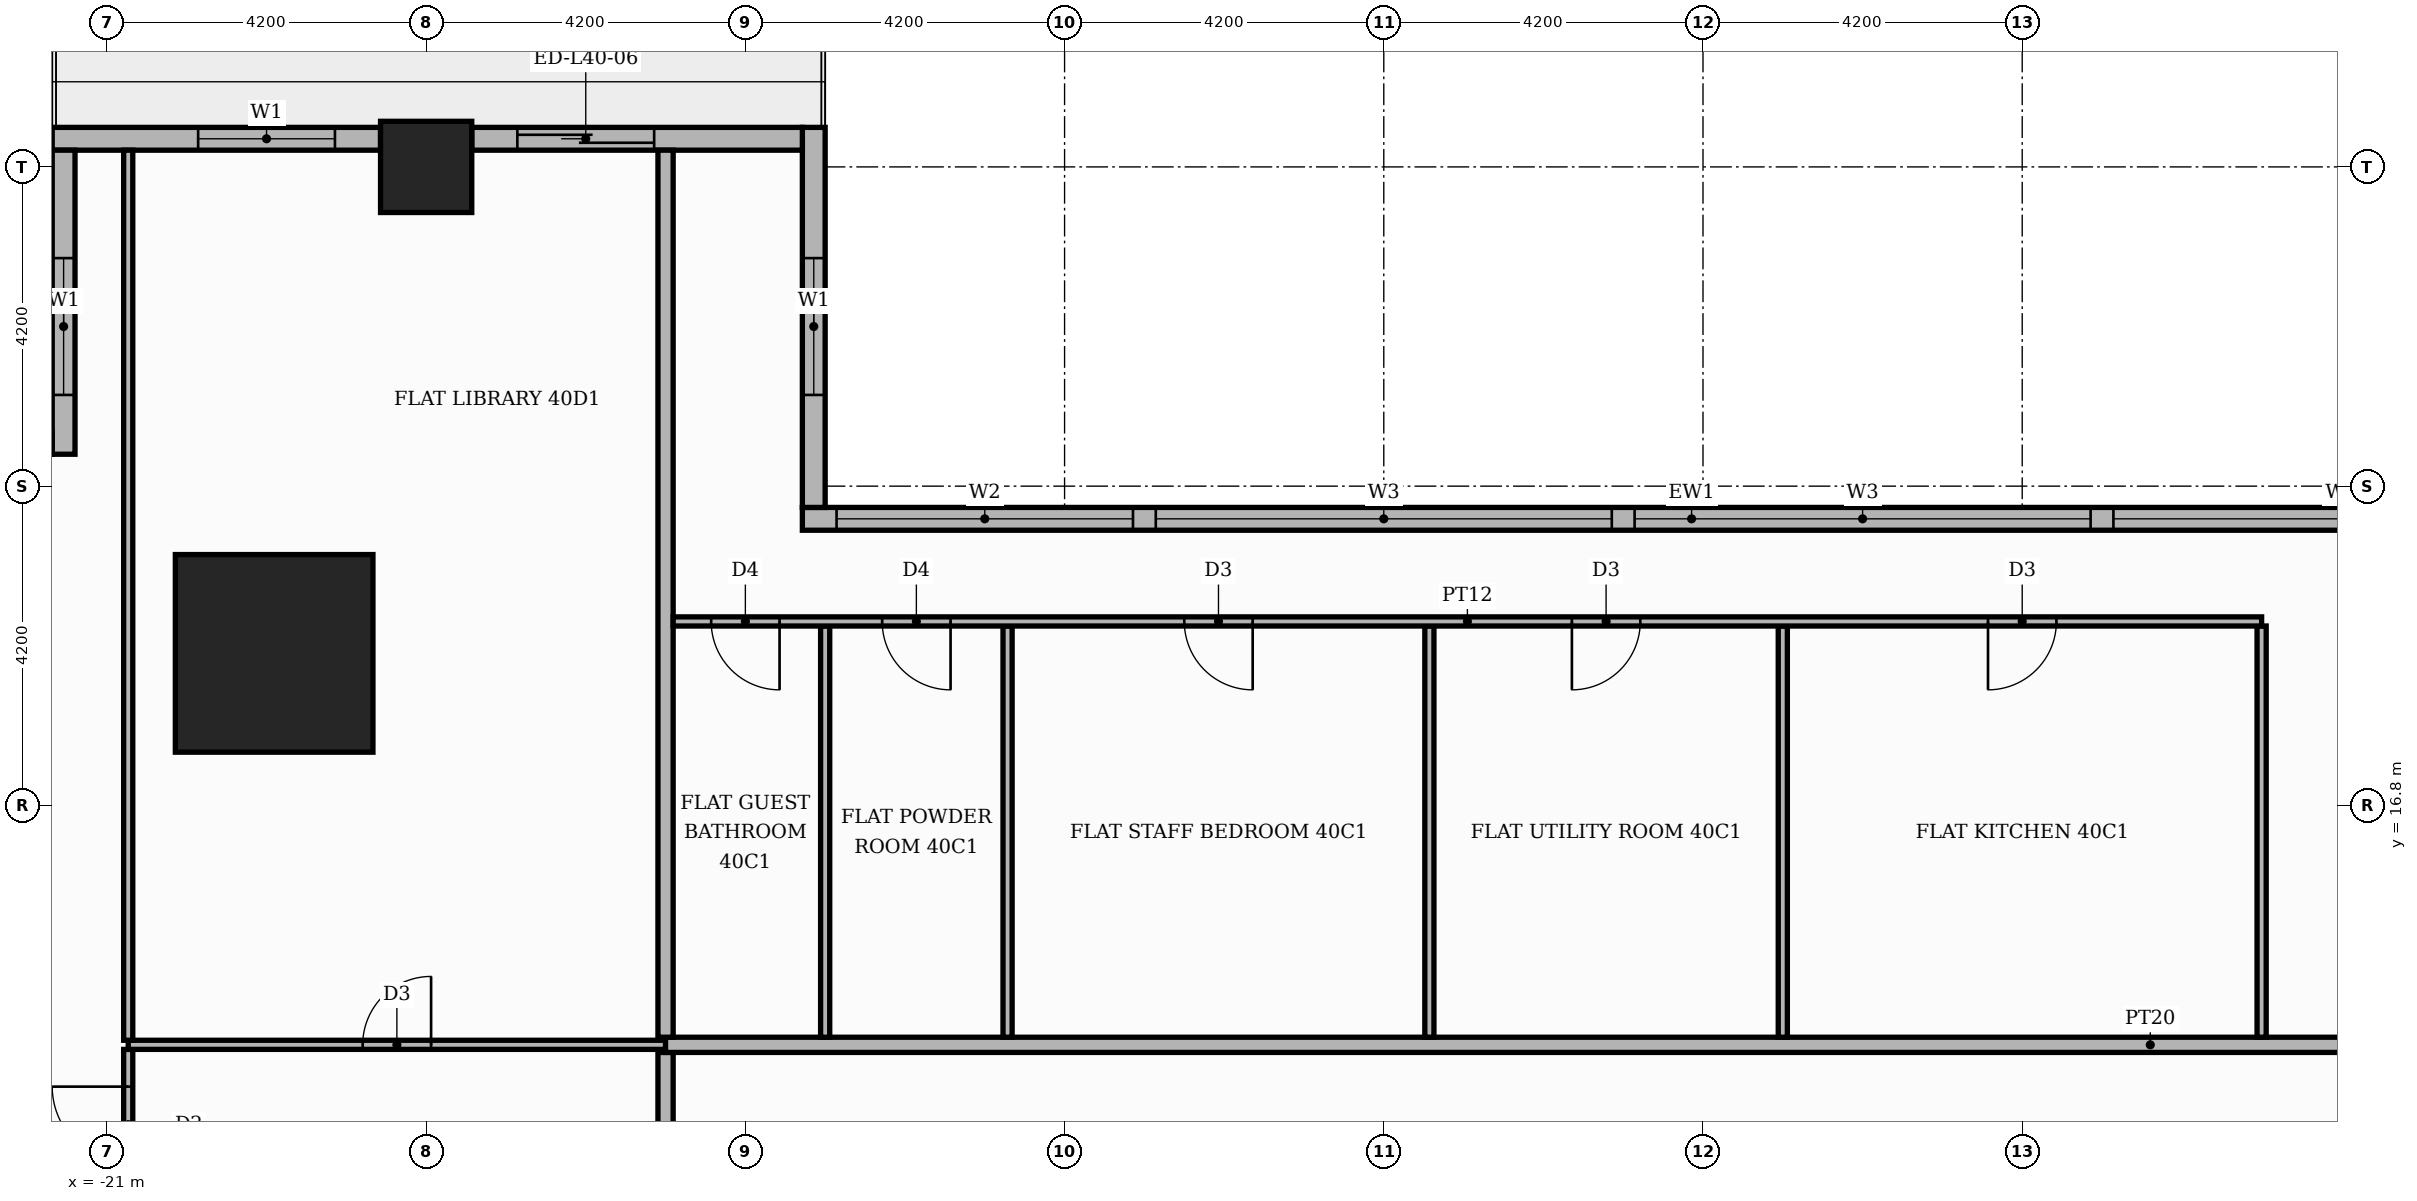
"""IFC4 building model, lengths in metres.
Left out: names, types, materials, properties, quantities, classifications, styles, units other than length and angle.
Written with IfcOpenShell. Run it as: python <this file> out.ifc"""

import sys

from ifc_helpers import new_model, si_unit, direction, frame, frame_2d, origin, origin_2d, place, context, subcontext, project, spatial, rectangle, extrude, element, fill, save


model = new_model("IFC4")
c1 = context("Model", 3, precision=1e-05, world=origin(), true_north=direction((0.0, 1.0)))
c2 = subcontext(c1, "Body", "Model", "MODEL_VIEW")
j1 = project(units=[si_unit("LENGTHUNIT", "METRE"), si_unit("PLANEANGLEUNIT", "RADIAN")], contexts=[c1])
p1 = place(None, origin())
s1 = spatial("IfcSite", under=j1, at=p1, CompositionType="ELEMENT")
p2 = place(p1, origin())
s2 = spatial("IfcBuilding", under=s1, at=p2, CompositionType="ELEMENT")
p3 = place(p2, frame((0.0, 0.0, 168.9)))
s3 = spatial("IfcBuildingStorey", under=s2, at=p3, CompositionType="ELEMENT", Elevation=168.9)
p4 = place(p3, frame((-18.8, 18.8, 0.0), z_axis=(0.0, 0.0, 1.0), x_axis=(1.0, 0.0, 0.0)))
e1 = element("IfcColumn", 1, at=p4, inside=s3, PredefinedType="COLUMN", context=c2, shape_type="SweptSolid", body=[
    extrude(rectangle(XDim=2.6, YDim=2.6, at=origin_2d()), origin(), (0.0, 0.0, 1.0), 3.9),
])
p5 = place(p3, frame((-16.8, 25.2, 0.0), z_axis=(0.0, 0.0, 1.0), x_axis=(1.0, 0.0, 0.0)))
e2 = element("IfcColumn", 2, at=p5, inside=s3, PredefinedType="COLUMN", context=c2, shape_type="SweptSolid", body=[
    extrude(rectangle(XDim=1.2, YDim=1.2, at=origin_2d()), origin(), (0.0, 0.0, 1.0), 3.9),
])
p6 = place(p3, frame((11.55, 20.57, 0.0), z_axis=(0.0, 0.0, 1.0), x_axis=(-1.0, 0.0, 0.0)))
e3 = element("IfcWall", 3, at=p6, inside=s3, PredefinedType="STANDARD", context=c2, shape_type="SweptSolid", body=[
    extrude(rectangle(XDim=23.4, YDim=0.3, at=frame_2d((11.7, 0.0))), origin(), (0.0, 0.0, 1.0), 3.48),
])
p7 = place(p6, frame((0.15, 0.0, 0.9)))
e4 = element("IfcOpeningElement", 4, at=p7, cuts=e3, PredefinedType="OPENING", context=c2, shape_type="SweptSolid", body=[
    extrude(rectangle(XDim=6.0, YDim=2.1, at=frame_2d((3.0, 1.05))), frame((0.0, 0.16, 0.0), z_axis=(0.0, -1.0, 0.0), x_axis=(1.0, 0.0, 0.0)), (0.0, 0.0, 1.0), 0.32),
])
p8 = place(p6, frame((6.45, 0.0, 0.9)))
e5 = element("IfcOpeningElement", 5, at=p8, cuts=e3, PredefinedType="OPENING", context=c2, shape_type="SweptSolid", body=[
    extrude(rectangle(XDim=6.0, YDim=2.1, at=frame_2d((3.0, 1.05))), frame((0.0, 0.16, 0.0), z_axis=(0.0, -1.0, 0.0), x_axis=(1.0, 0.0, 0.0)), (0.0, 0.0, 1.0), 0.32),
])
p9 = place(p6, frame((12.75, 0.0, 0.9)))
e6 = element("IfcOpeningElement", 6, at=p9, cuts=e3, PredefinedType="OPENING", context=c2, shape_type="SweptSolid", body=[
    extrude(rectangle(XDim=6.0, YDim=2.1, at=frame_2d((3.0, 1.05))), frame((0.0, 0.16, 0.0), z_axis=(0.0, -1.0, 0.0), x_axis=(1.0, 0.0, 0.0)), (0.0, 0.0, 1.0), 0.32),
])
p10 = place(p6, frame((19.05, 0.0, 0.9)))
e7 = element("IfcOpeningElement", 7, at=p10, cuts=e3, PredefinedType="OPENING", context=c2, shape_type="SweptSolid", body=[
    extrude(rectangle(XDim=3.9, YDim=2.1, at=frame_2d((1.95, 1.05))), frame((0.0, 0.16, 0.0), z_axis=(0.0, -1.0, 0.0), x_axis=(1.0, 0.0, 0.0)), (0.0, 0.0, 1.0), 0.32),
])
p11 = place(p3, frame((-11.7, 20.72, 0.0), z_axis=(0.0, 0.0, 1.0), x_axis=(0.0, 1.0, 0.0)))
e8 = element("IfcWall", 8, at=p11, inside=s3, PredefinedType="STANDARD", context=c2, shape_type="SweptSolid", body=[
    extrude(rectangle(XDim=5.0, YDim=0.3, at=frame_2d((2.5, 0.0))), origin(), (0.0, 0.0, 1.0), 3.48),
])
p12 = place(p11, frame((1.48, 0.0, 0.9)))
e9 = element("IfcOpeningElement", 9, at=p12, cuts=e8, PredefinedType="OPENING", context=c2, shape_type="SweptSolid", body=[
    extrude(rectangle(XDim=1.8, YDim=2.1, at=frame_2d((0.9, 1.05))), frame((0.0, 0.16, 0.0), z_axis=(0.0, -1.0, 0.0), x_axis=(1.0, 0.0, 0.0)), (0.0, 0.0, 1.0), 0.32),
])
p13 = place(p3, frame((-11.85, 25.57, 0.0), z_axis=(0.0, 0.0, 1.0), x_axis=(-1.0, 0.0, 0.0)))
e10 = element("IfcWall", 10, at=p13, inside=s3, PredefinedType="STANDARD", context=c2, shape_type="SweptSolid", body=[
    extrude(rectangle(XDim=4.35, YDim=0.3, at=frame_2d((2.175, 0.0))), origin(), (0.0, 0.0, 1.0), 3.48),
])
p14 = place(p13, frame((1.95, 0.0, 0.0)))
e11 = element("IfcOpeningElement", 11, at=p14, cuts=e10, PredefinedType="OPENING", context=c2, shape_type="SweptSolid", body=[
    extrude(rectangle(XDim=1.8, YDim=2.4, at=frame_2d((0.9, 1.2))), frame((0.0, 0.16, 0.0), z_axis=(0.0, -1.0, 0.0), x_axis=(1.0, 0.0, 0.0)), (0.0, 0.0, 1.0), 0.32),
])
p15 = place(p3, frame((-17.4, 25.57, 0.0), z_axis=(0.0, 0.0, 1.0), x_axis=(-1.0, 0.0, 0.0)))
e12 = element("IfcWall", 12, at=p15, inside=s3, PredefinedType="STANDARD", context=c2, shape_type="SweptSolid", body=[
    extrude(rectangle(XDim=4.32, YDim=0.3, at=frame_2d((2.16, 0.0))), origin(), (0.0, 0.0, 1.0), 3.48),
])
p16 = place(p15, frame((0.6, 0.0, 0.9)))
e13 = element("IfcOpeningElement", 13, at=p16, cuts=e12, PredefinedType="OPENING", context=c2, shape_type="SweptSolid", body=[
    extrude(rectangle(XDim=1.8, YDim=2.1, at=frame_2d((0.9, 1.05))), frame((0.0, 0.16, 0.0), z_axis=(0.0, -1.0, 0.0), x_axis=(1.0, 0.0, 0.0)), (0.0, 0.0, 1.0), 0.32),
])
p17 = place(p3, frame((-21.57, 25.42, 0.0), z_axis=(0.0, 0.0, 1.0), x_axis=(0.0, -1.0, 0.0)))
e14 = element("IfcWall", 14, at=p17, inside=s3, PredefinedType="STANDARD", context=c2, shape_type="SweptSolid", body=[
    extrude(rectangle(XDim=4.0, YDim=0.3, at=frame_2d((2.0, 0.0))), origin(), (0.0, 0.0, 1.0), 3.48),
])
p18 = place(p17, frame((1.42, 0.0, 0.9)))
e15 = element("IfcOpeningElement", 15, at=p18, cuts=e14, PredefinedType="OPENING", context=c2, shape_type="SweptSolid", body=[
    extrude(rectangle(XDim=1.8, YDim=2.1, at=frame_2d((0.9, 1.05))), frame((0.0, 0.16, 0.0), z_axis=(0.0, -1.0, 0.0), x_axis=(1.0, 0.0, 0.0)), (0.0, 0.0, 1.0), 0.32),
])
p19 = place(p3, frame((-13.65, 11.1, 0.0), z_axis=(0.0, 0.0, 1.0), x_axis=(0.0, 1.0, 0.0)))
e16 = element("IfcWall", 16, at=p19, inside=s3, PredefinedType="PARTITIONING", context=c2, shape_type="SweptSolid", body=[
    extrude(rectangle(XDim=2.45, YDim=0.2, at=frame_2d((1.225, 0.0))), origin(), (0.0, 0.0, 1.0), 3.48),
])
p20 = place(p3, frame((-20.72, 11.61, 0.0), z_axis=(0.0, 0.0, 1.0), x_axis=(0.0, 1.0, 0.0)))
e17 = element("IfcWall", 17, at=p20, inside=s3, PredefinedType="PARTITIONING", context=c2, shape_type="SweptSolid", body=[
    extrude(rectangle(XDim=1.98, YDim=0.12, at=frame_2d((0.99, 0.0))), origin(), (0.0, 0.0, 1.0), 3.48),
])
p21 = place(p20, frame((0.49, 0.0, 0.0)))
e18 = element("IfcOpeningElement", 18, at=p21, cuts=e17, PredefinedType="OPENING", context=c2, shape_type="SweptSolid", body=[
    extrude(rectangle(XDim=1.0, YDim=2.1, at=frame_2d((0.5, 1.05))), frame((0.0, 0.07, 0.0), z_axis=(0.0, -1.0, 0.0), x_axis=(1.0, 0.0, 0.0)), (0.0, 0.0, 1.0), 0.14),
])
p22 = place(p3, frame((-20.72, 13.65, 0.0), z_axis=(0.0, 0.0, 1.0), x_axis=(1.0, 0.0, 0.0)))
e19 = element("IfcWall", 19, at=p22, inside=s3, PredefinedType="PARTITIONING", context=c2, shape_type="SweptSolid", body=[
    extrude(rectangle(XDim=7.07, YDim=0.12, at=frame_2d((3.535, 0.0))), origin(), (0.0, 0.0, 1.0), 3.48),
])
p23 = place(p22, frame((3.085, 0.0, 0.0)))
e20 = element("IfcOpeningElement", 20, at=p23, cuts=e19, PredefinedType="OPENING", context=c2, shape_type="SweptSolid", body=[
    extrude(rectangle(XDim=0.9, YDim=2.1, at=frame_2d((0.45, 1.05))), frame((0.0, 0.07, 0.0), z_axis=(0.0, -1.0, 0.0), x_axis=(1.0, 0.0, 0.0)), (0.0, 0.0, 1.0), 0.14),
])
p24 = place(p3, frame((-13.65, 13.65, 0.0), z_axis=(0.0, 0.0, 1.0), x_axis=(1.0, 0.0, 0.0)))
e21 = element("IfcWall", 21, at=p24, inside=s3, PredefinedType="PARTITIONING", context=c2, shape_type="SweptSolid", body=[
    extrude(rectangle(XDim=39.07, YDim=0.2, at=frame_2d((19.535, 0.0))), origin(), (0.0, 0.0, 1.0), 3.48),
])
p25 = place(p24, frame((23.6, 0.0, 0.0)))
e22 = element("IfcOpeningElement", 22, at=p25, cuts=e21, PredefinedType="OPENING", context=c2, shape_type="SweptSolid", body=[
    extrude(rectangle(XDim=1.1, YDim=2.4, at=frame_2d((0.55, 1.2))), frame((0.0, 0.11, 0.0), z_axis=(0.0, -1.0, 0.0), x_axis=(1.0, 0.0, 0.0)), (0.0, 0.0, 1.0), 0.22),
])
p26 = place(p3, frame((-20.72, 13.71, 0.0), z_axis=(0.0, 0.0, 1.0), x_axis=(0.0, 1.0, 0.0)))
e23 = element("IfcWall", 23, at=p26, inside=s3, PredefinedType="PARTITIONING", context=c2, shape_type="SweptSolid", body=[
    extrude(rectangle(XDim=11.71, YDim=0.12, at=frame_2d((5.855, 0.0))), origin(), (0.0, 0.0, 1.0), 3.48),
])
p27 = place(p3, frame((-13.65, 13.75, 0.0), z_axis=(0.0, 0.0, 1.0), x_axis=(0.0, 1.0, 0.0)))
e24 = element("IfcWall", 24, at=p27, inside=s3, PredefinedType="PARTITIONING", context=c2, shape_type="SweptSolid", body=[
    extrude(rectangle(XDim=11.67, YDim=0.2, at=frame_2d((5.835, 0.0))), origin(), (0.0, 0.0, 1.0), 3.48),
])
for number, where, z_axis, x_axis in (
    (25, (-11.55, 13.75, 0.0), (0.0, 0.0, 1.0), (0.0, 1.0, 0.0)),
    (26, (-9.15, 13.75, 0.0), (0.0, 0.0, 1.0), (0.0, 1.0, 0.0)),
    (27, (-3.6, 13.75, 0.0), (0.0, 0.0, 1.0), (0.0, 1.0, 0.0)),
    (28, (1.05, 13.75, 0.0), (0.0, 0.0, 1.0), (0.0, 1.0, 0.0)),
    (29, (7.35, 13.75, 0.0), (0.0, 0.0, 1.0), (0.0, 1.0, 0.0)),
):
    element("IfcWall", number, at=place(p3, frame(where, z_axis=z_axis, x_axis=x_axis)), inside=s3, PredefinedType="PARTITIONING", context=c2, shape_type="SweptSolid", body=[
        extrude(rectangle(XDim=5.41, YDim=0.12, at=frame_2d((2.705, 0.0))), origin(), (0.0, 0.0, 1.0), 3.48),
    ])
p28 = place(p3, frame((-13.55, 19.22, 0.0), z_axis=(0.0, 0.0, 1.0), x_axis=(1.0, 0.0, 0.0)))
e30 = element("IfcWall", 30, at=p28, inside=s3, PredefinedType="PARTITIONING", context=c2, shape_type="SweptSolid", body=[
    extrude(rectangle(XDim=20.9, YDim=0.12, at=frame_2d((10.45, 0.0))), origin(), (0.0, 0.0, 1.0), 3.48),
])
p29 = place(p28, frame((17.3, 0.0, 0.0)))
e31 = element("IfcOpeningElement", 31, at=p29, cuts=e30, PredefinedType="OPENING", context=c2, shape_type="SweptSolid", body=[
    extrude(rectangle(XDim=0.9, YDim=2.1, at=frame_2d((0.45, 1.05))), frame((0.0, 0.07, 0.0), z_axis=(0.0, -1.0, 0.0), x_axis=(1.0, 0.0, 0.0)), (0.0, 0.0, 1.0), 0.14),
])
p30 = place(p28, frame((11.825, 0.0, 0.0)))
e32 = element("IfcOpeningElement", 32, at=p30, cuts=e30, PredefinedType="OPENING", context=c2, shape_type="SweptSolid", body=[
    extrude(rectangle(XDim=0.9, YDim=2.1, at=frame_2d((0.45, 1.05))), frame((0.0, 0.07, 0.0), z_axis=(0.0, -1.0, 0.0), x_axis=(1.0, 0.0, 0.0)), (0.0, 0.0, 1.0), 0.14),
])
p31 = place(p28, frame((6.725, 0.0, 0.0)))
e33 = element("IfcOpeningElement", 33, at=p31, cuts=e30, PredefinedType="OPENING", context=c2, shape_type="SweptSolid", body=[
    extrude(rectangle(XDim=0.9, YDim=2.1, at=frame_2d((0.45, 1.05))), frame((0.0, 0.07, 0.0), z_axis=(0.0, -1.0, 0.0), x_axis=(1.0, 0.0, 0.0)), (0.0, 0.0, 1.0), 0.14),
])
p32 = place(p28, frame((2.75, 0.0, 0.0)))
e34 = element("IfcOpeningElement", 34, at=p32, cuts=e30, PredefinedType="OPENING", context=c2, shape_type="SweptSolid", body=[
    extrude(rectangle(XDim=0.9, YDim=2.1, at=frame_2d((0.45, 1.05))), frame((0.0, 0.07, 0.0), z_axis=(0.0, -1.0, 0.0), x_axis=(1.0, 0.0, 0.0)), (0.0, 0.0, 1.0), 0.14),
])
p33 = place(p28, frame((0.5, 0.0, 0.0)))
e35 = element("IfcOpeningElement", 35, at=p33, cuts=e30, PredefinedType="OPENING", context=c2, shape_type="SweptSolid", body=[
    extrude(rectangle(XDim=0.9, YDim=2.1, at=frame_2d((0.45, 1.05))), frame((0.0, 0.07, 0.0), z_axis=(0.0, -1.0, 0.0), x_axis=(1.0, 0.0, 0.0)), (0.0, 0.0, 1.0), 0.14),
])
p34 = place(p7, origin())
e36 = element("IfcWindow", 36, at=p34, inside=s3, PartitioningType="SINGLE_PANEL", PredefinedType="WINDOW", context=c2, shape_type="SweptSolid", body=[
    extrude(rectangle(XDim=6.0, YDim=2.1, at=frame_2d((3.0, 1.05))), frame((0.0, 0.03, 0.0), z_axis=(0.0, -1.0, 0.0), x_axis=(1.0, 0.0, 0.0)), (0.0, 0.0, 1.0), 0.06),
])
fill(e4, e36)
p35 = place(p8, origin())
e37 = element("IfcWindow", 37, at=p35, inside=s3, PartitioningType="SINGLE_PANEL", PredefinedType="WINDOW", context=c2, shape_type="SweptSolid", body=[
    extrude(rectangle(XDim=6.0, YDim=2.1, at=frame_2d((3.0, 1.05))), frame((0.0, 0.03, 0.0), z_axis=(0.0, -1.0, 0.0), x_axis=(1.0, 0.0, 0.0)), (0.0, 0.0, 1.0), 0.06),
])
fill(e5, e37)
p36 = place(p9, origin())
e38 = element("IfcWindow", 38, at=p36, inside=s3, PartitioningType="SINGLE_PANEL", PredefinedType="WINDOW", context=c2, shape_type="SweptSolid", body=[
    extrude(rectangle(XDim=6.0, YDim=2.1, at=frame_2d((3.0, 1.05))), frame((0.0, 0.03, 0.0), z_axis=(0.0, -1.0, 0.0), x_axis=(1.0, 0.0, 0.0)), (0.0, 0.0, 1.0), 0.06),
])
fill(e6, e38)
p37 = place(p10, origin())
e39 = element("IfcWindow", 39, at=p37, inside=s3, PartitioningType="SINGLE_PANEL", PredefinedType="WINDOW", context=c2, shape_type="SweptSolid", body=[
    extrude(rectangle(XDim=3.9, YDim=2.1, at=frame_2d((1.95, 1.05))), frame((0.0, 0.03, 0.0), z_axis=(0.0, -1.0, 0.0), x_axis=(1.0, 0.0, 0.0)), (0.0, 0.0, 1.0), 0.06),
])
fill(e7, e39)
p38 = place(p12, origin())
e40 = element("IfcWindow", 40, at=p38, inside=s3, PartitioningType="SINGLE_PANEL", PredefinedType="WINDOW", context=c2, shape_type="SweptSolid", body=[
    extrude(rectangle(XDim=1.8, YDim=2.1, at=frame_2d((0.9, 1.05))), frame((0.0, 0.03, 0.0), z_axis=(0.0, -1.0, 0.0), x_axis=(1.0, 0.0, 0.0)), (0.0, 0.0, 1.0), 0.06),
])
fill(e9, e40)
p39 = place(p14, origin())
e41 = element("IfcDoor", 41, at=p39, inside=s3, OperationType="SLIDING_TO_RIGHT", PredefinedType="DOOR", context=c2, shape_type="SweptSolid", body=[
    extrude(rectangle(XDim=1.8, YDim=2.4, at=frame_2d((0.9, 1.2))), frame((0.0, 0.025, 0.0), z_axis=(0.0, -1.0, 0.0), x_axis=(1.0, 0.0, 0.0)), (0.0, 0.0, 1.0), 0.05),
])
fill(e11, e41)
p40 = place(p16, origin())
e42 = element("IfcWindow", 42, at=p40, inside=s3, PartitioningType="SINGLE_PANEL", PredefinedType="WINDOW", context=c2, shape_type="SweptSolid", body=[
    extrude(rectangle(XDim=1.8, YDim=2.1, at=frame_2d((0.9, 1.05))), frame((0.0, 0.03, 0.0), z_axis=(0.0, -1.0, 0.0), x_axis=(1.0, 0.0, 0.0)), (0.0, 0.0, 1.0), 0.06),
])
fill(e13, e42)
p41 = place(p18, origin())
e43 = element("IfcWindow", 43, at=p41, inside=s3, PartitioningType="SINGLE_PANEL", PredefinedType="WINDOW", context=c2, shape_type="SweptSolid", body=[
    extrude(rectangle(XDim=1.8, YDim=2.1, at=frame_2d((0.9, 1.05))), frame((0.0, 0.03, 0.0), z_axis=(0.0, -1.0, 0.0), x_axis=(1.0, 0.0, 0.0)), (0.0, 0.0, 1.0), 0.06),
])
fill(e15, e43)
p42 = place(p29, frame((0.9, 0.0, 0.0), z_axis=(0.0, 0.0, 1.0), x_axis=(-1.0, 0.0, 0.0)))
e44 = element("IfcDoor", 44, at=p42, inside=s3, OperationType="SINGLE_SWING_LEFT", PredefinedType="DOOR", context=c2, shape_type="SweptSolid", body=[
    extrude(rectangle(XDim=0.9, YDim=2.1, at=frame_2d((0.45, 1.05))), frame((0.0, 0.025, 0.0), z_axis=(0.0, -1.0, 0.0), x_axis=(1.0, 0.0, 0.0)), (0.0, 0.0, 1.0), 0.05),
])
fill(e31, e44)
p43 = place(p30, frame((0.9, 0.0, 0.0), z_axis=(0.0, 0.0, 1.0), x_axis=(-1.0, 0.0, 0.0)))
e45 = element("IfcDoor", 45, at=p43, inside=s3, OperationType="SINGLE_SWING_LEFT", PredefinedType="DOOR", context=c2, shape_type="SweptSolid", body=[
    extrude(rectangle(XDim=0.9, YDim=2.1, at=frame_2d((0.45, 1.05))), frame((0.0, 0.025, 0.0), z_axis=(0.0, -1.0, 0.0), x_axis=(1.0, 0.0, 0.0)), (0.0, 0.0, 1.0), 0.05),
])
fill(e32, e45)
p44 = place(p31, frame((0.9, 0.0, 0.0), z_axis=(0.0, 0.0, 1.0), x_axis=(-1.0, 0.0, 0.0)))
e46 = element("IfcDoor", 46, at=p44, inside=s3, OperationType="SINGLE_SWING_RIGHT", PredefinedType="DOOR", context=c2, shape_type="SweptSolid", body=[
    extrude(rectangle(XDim=0.9, YDim=2.1, at=frame_2d((0.45, 1.05))), frame((0.0, 0.025, 0.0), z_axis=(0.0, -1.0, 0.0), x_axis=(1.0, 0.0, 0.0)), (0.0, 0.0, 1.0), 0.05),
])
fill(e33, e46)
p45 = place(p32, frame((0.9, 0.0, 0.0), z_axis=(0.0, 0.0, 1.0), x_axis=(-1.0, 0.0, 0.0)))
e47 = element("IfcDoor", 47, at=p45, inside=s3, OperationType="SINGLE_SWING_RIGHT", PredefinedType="DOOR", context=c2, shape_type="SweptSolid", body=[
    extrude(rectangle(XDim=0.9, YDim=2.1, at=frame_2d((0.45, 1.05))), frame((0.0, 0.025, 0.0), z_axis=(0.0, -1.0, 0.0), x_axis=(1.0, 0.0, 0.0)), (0.0, 0.0, 1.0), 0.05),
])
fill(e34, e47)
p46 = place(p33, frame((0.9, 0.0, 0.0), z_axis=(0.0, 0.0, 1.0), x_axis=(-1.0, 0.0, 0.0)))
e48 = element("IfcDoor", 48, at=p46, inside=s3, OperationType="SINGLE_SWING_RIGHT", PredefinedType="DOOR", context=c2, shape_type="SweptSolid", body=[
    extrude(rectangle(XDim=0.9, YDim=2.1, at=frame_2d((0.45, 1.05))), frame((0.0, 0.025, 0.0), z_axis=(0.0, -1.0, 0.0), x_axis=(1.0, 0.0, 0.0)), (0.0, 0.0, 1.0), 0.05),
])
fill(e35, e48)
p47 = place(p23, origin())
e49 = element("IfcDoor", 49, at=p47, inside=s3, OperationType="SINGLE_SWING_RIGHT", PredefinedType="DOOR", context=c2, shape_type="SweptSolid", body=[
    extrude(rectangle(XDim=0.9, YDim=2.1, at=frame_2d((0.45, 1.05))), frame((0.0, 0.025, 0.0), z_axis=(0.0, -1.0, 0.0), x_axis=(1.0, 0.0, 0.0)), (0.0, 0.0, 1.0), 0.05),
])
fill(e20, e49)
p48 = place(p21, origin())
e50 = element("IfcDoor", 50, at=p48, inside=s3, OperationType="SINGLE_SWING_RIGHT", PredefinedType="DOOR", context=c2, shape_type="SweptSolid", body=[
    extrude(rectangle(XDim=1.0, YDim=2.1, at=frame_2d((0.5, 1.05))), frame((0.0, 0.025, 0.0), z_axis=(0.0, -1.0, 0.0), x_axis=(1.0, 0.0, 0.0)), (0.0, 0.0, 1.0), 0.05),
])
fill(e18, e50)
save(model, sys.argv[1])
